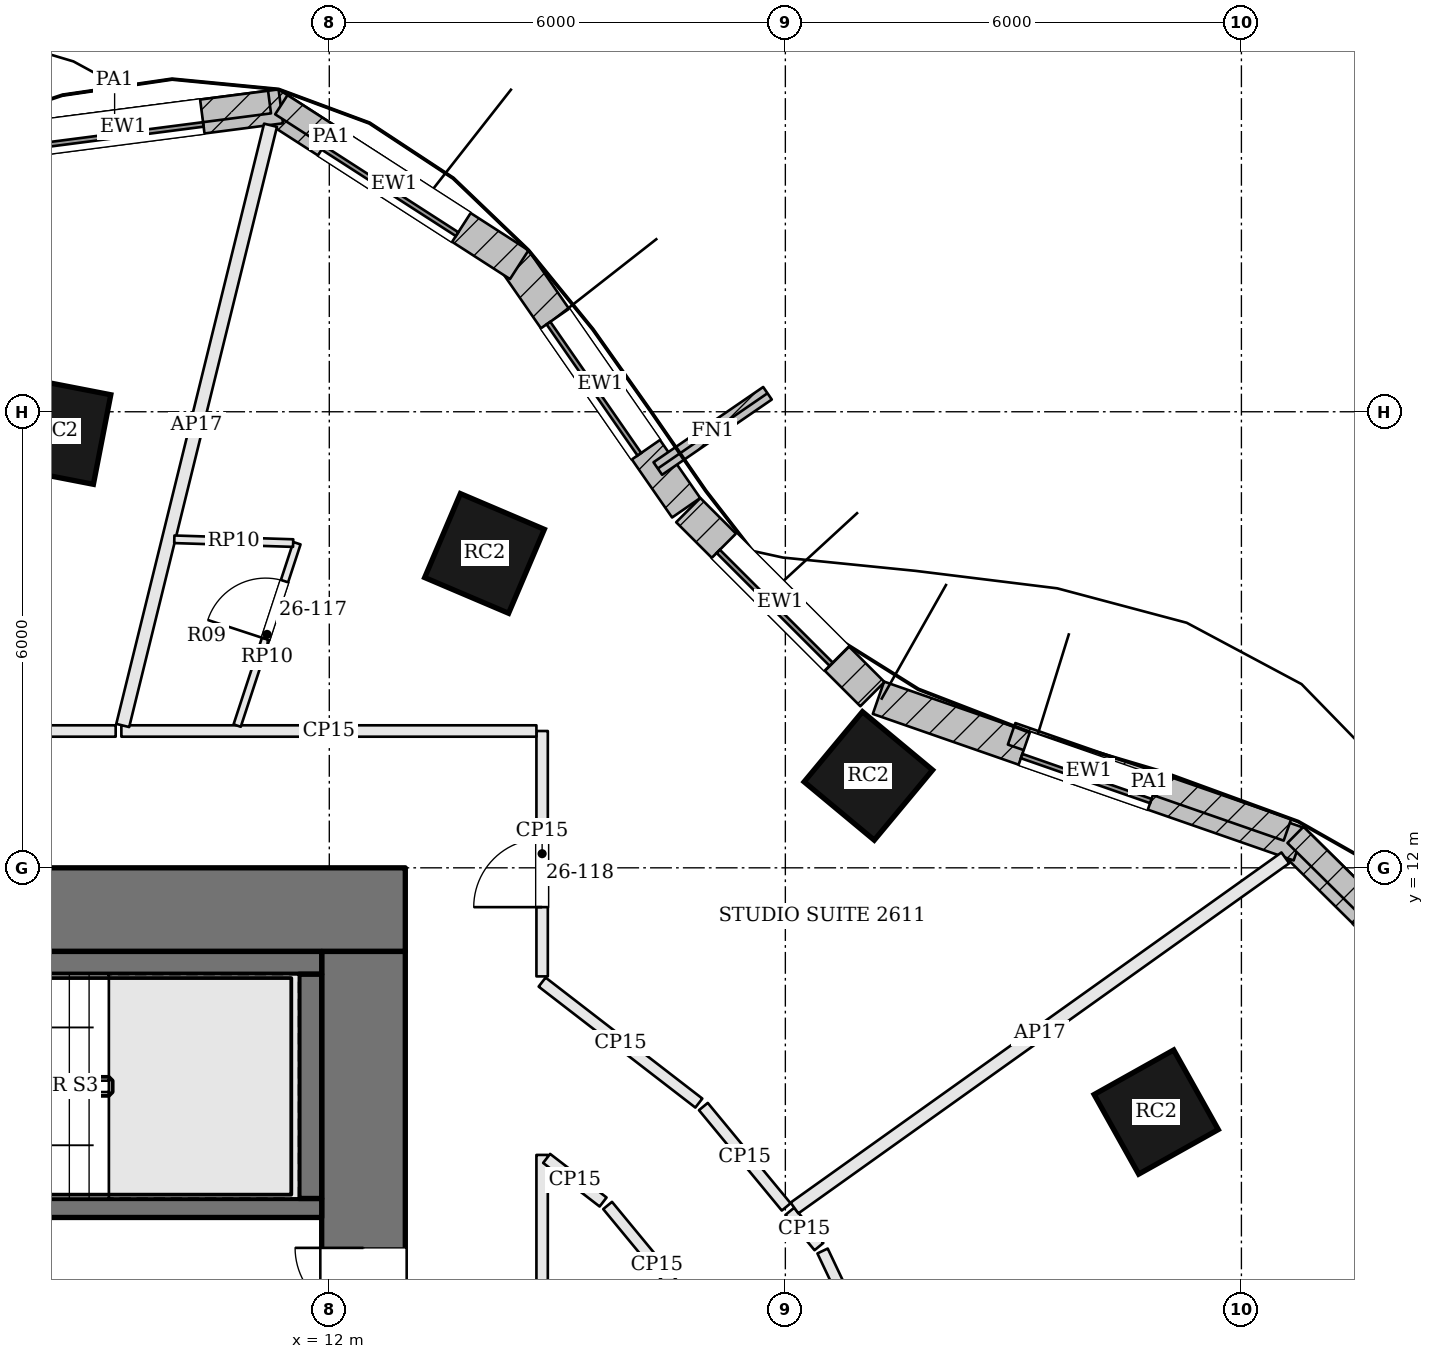
"""IFC4 building model, lengths in metres.
Left out: names, types, materials, properties, quantities, classifications, styles, units other than length and angle.
Written with IfcOpenShell. Run it as: python <this file> out.ifc"""

import sys

from ifc_helpers import new_model, si_unit, direction, frame, frame_2d, origin, origin_2d, place, context, subcontext, project, spatial, rectangle, extrude, element, fill, save


model = new_model("IFC4")
c1 = context("Model", 3, precision=1e-05, world=origin(), true_north=direction((0.0, 1.0)))
c2 = subcontext(c1, "Body", "Model", "MODEL_VIEW")
j1 = project(units=[si_unit("LENGTHUNIT", "METRE"), si_unit("PLANEANGLEUNIT", "RADIAN")], contexts=[c1])
p1 = place(None, origin())
s1 = spatial("IfcSite", under=j1, at=p1, CompositionType="ELEMENT")
p2 = place(p1, origin())
s2 = spatial("IfcBuilding", under=s1, at=p2, CompositionType="ELEMENT")
p3 = place(p2, frame((0.0, 0.0, 110.4)))
s3 = spatial("IfcBuildingStorey", under=s2, at=p3, CompositionType="ELEMENT", Elevation=110.4)
p4 = place(p3, frame((-13.0, 11.45, 0.0), z_axis=(0.0, 0.0, 1.0), x_axis=(1.0, 0.0, 0.0)))
e1 = element("IfcWall", 1, at=p4, inside=s3, PredefinedType="SHEAR", context=c2, shape_type="SweptSolid", body=[
    extrude(rectangle(XDim=26.0, YDim=1.1, at=frame_2d((13.0, 0.0))), origin(), (0.0, 0.0, 1.0), 3.6),
])
p5 = place(p4, frame((9.225, 0.0, 0.0)))
e2 = element("IfcOpeningElement", 2, at=p5, cuts=e1, PredefinedType="OPENING", context=c2, shape_type="SweptSolid", body=[
    extrude(rectangle(XDim=1.0, YDim=2.1, at=frame_2d((0.5, 1.05))), frame((0.0, 0.56, 0.0), z_axis=(0.0, -1.0, 0.0), x_axis=(1.0, 0.0, 0.0)), (0.0, 0.0, 1.0), 1.12),
])
p6 = place(p4, frame((11.825, 0.0, 0.0)))
e3 = element("IfcOpeningElement", 3, at=p6, cuts=e1, PredefinedType="OPENING", context=c2, shape_type="SweptSolid", body=[
    extrude(rectangle(XDim=0.7, YDim=2.1, at=frame_2d((0.35, 1.05))), frame((0.0, 0.56, 0.0), z_axis=(0.0, -1.0, 0.0), x_axis=(1.0, 0.0, 0.0)), (0.0, 0.0, 1.0), 1.12),
])
p7 = place(p4, frame((13.725, 0.0, 0.0)))
e4 = element("IfcOpeningElement", 4, at=p7, cuts=e1, PredefinedType="OPENING", context=c2, shape_type="SweptSolid", body=[
    extrude(rectangle(XDim=1.0, YDim=2.1, at=frame_2d((0.5, 1.05))), frame((0.0, 0.56, 0.0), z_axis=(0.0, -1.0, 0.0), x_axis=(1.0, 0.0, 0.0)), (0.0, 0.0, 1.0), 1.12),
])
p8 = place(p4, frame((16.225, 0.0, 0.0)))
e5 = element("IfcOpeningElement", 5, at=p8, cuts=e1, PredefinedType="OPENING", context=c2, shape_type="SweptSolid", body=[
    extrude(rectangle(XDim=0.9, YDim=2.1, at=frame_2d((0.45, 1.05))), frame((0.0, 0.56, 0.0), z_axis=(0.0, -1.0, 0.0), x_axis=(1.0, 0.0, 0.0)), (0.0, 0.0, 1.0), 1.12),
])
p9 = place(p3, frame((12.45, -1.9, 0.0), z_axis=(0.0, 0.0, 1.0), x_axis=(0.0, 1.0, 0.0)))
e6 = element("IfcWall", 6, at=p9, inside=s3, PredefinedType="SHEAR", context=c2, shape_type="SweptSolid", body=[
    extrude(rectangle(XDim=12.8, YDim=1.1, at=frame_2d((6.4, 0.0))), origin(), (0.0, 0.0, 1.0), 3.6),
])
p10 = place(p9, frame((7.1, 0.0, 0.0)))
e7 = element("IfcOpeningElement", 7, at=p10, cuts=e6, PredefinedType="OPENING", context=c2, shape_type="SweptSolid", body=[
    extrude(rectangle(XDim=1.8, YDim=2.1, at=frame_2d((0.9, 1.05))), frame((0.0, 0.56, 0.0), z_axis=(0.0, -1.0, 0.0), x_axis=(1.0, 0.0, 0.0)), (0.0, 0.0, 1.0), 1.12),
])
for number, where, z_axis, x_axis in (
    (8, (22.879, 8.787, 0.0), (0.0, 0.0, 1.0), (-0.489, 0.873, 0.0)),
    (9, (19.092, 13.209, 0.0), (0.0, 0.0, 1.0), (-0.769, 0.639, 0.0)),
    (10, (14.042, 16.136, 0.0), (0.0, 0.0, 1.0), (-0.92, 0.392, 0.0)),
    (11, (8.422, 17.749, 0.0), (0.0, 0.0, 1.0), (-0.982, 0.191, 0.0)),
):
    element("IfcColumn", number, at=place(p3, frame(where, z_axis=z_axis, x_axis=x_axis)), inside=s3, PredefinedType="COLUMN", context=c2, shape_type="SweptSolid", body=[
        extrude(rectangle(XDim=1.2, YDim=1.2, at=origin_2d()), origin(), (0.0, 0.0, 1.0), 3.6),
    ])
p11 = place(p3, frame((28.068, 9.011, 0.0), z_axis=(0.0, 0.0, 1.0), x_axis=(-0.711293453435, 0.702895172199, 0.0)))
e12 = element("IfcWall", 12, at=p11, inside=s3, PredefinedType="SOLIDWALL", context=c2, shape_type="SweptSolid", body=[
    extrude(rectangle(XDim=4.768, YDim=0.45, at=frame_2d((2.384, 0.0))), origin(), (0.0, 0.0, 1.0), 3.4),
])
p12 = place(p11, frame((1.334, 0.0, 0.9)))
e13 = element("IfcOpeningElement", 13, at=p12, cuts=e12, PredefinedType="OPENING", context=c2, shape_type="SweptSolid", body=[
    extrude(rectangle(XDim=2.1, YDim=2.0, at=frame_2d((1.05, 1.0))), frame((0.0, 0.235, 0.0), z_axis=(0.0, -1.0, 0.0), x_axis=(1.0, 0.0, 0.0)), (0.0, 0.0, 1.0), 0.47),
])
p13 = place(p3, frame((24.761, 12.31, 0.0), z_axis=(0.0, 0.0, 1.0), x_axis=(-0.944397305248, 0.328806523414, 0.0)))
e14 = element("IfcWall", 14, at=p13, inside=s3, PredefinedType="SOLIDWALL", context=c2, shape_type="SweptSolid", body=[
    extrude(rectangle(XDim=5.862, YDim=0.45, at=frame_2d((2.931, 0.0))), origin(), (0.0, 0.0, 1.0), 3.4),
])
p14 = place(p13, frame((2.031, 0.0, 0.9)))
e15 = element("IfcOpeningElement", 15, at=p14, cuts=e14, PredefinedType="OPENING", context=c2, shape_type="SweptSolid", body=[
    extrude(rectangle(XDim=1.8, YDim=2.0, at=frame_2d((0.9, 1.0))), frame((0.0, 0.235, 0.0), z_axis=(0.0, -1.0, 0.0), x_axis=(1.0, 0.0, 0.0)), (0.0, 0.0, 1.0), 0.47),
])
p15 = place(p3, frame((19.145, 14.285, 0.0), z_axis=(0.0, 0.0, 1.0), x_axis=(-0.707427521052, 0.706785895769, 0.0)))
e16 = element("IfcWall", 16, at=p15, inside=s3, PredefinedType="SOLIDWALL", context=c2, shape_type="SweptSolid", body=[
    extrude(rectangle(XDim=3.425, YDim=0.45, at=frame_2d((1.712, 0.0))), origin(), (0.0, 0.0, 1.0), 3.4),
])
p16 = place(p15, frame((0.662, 0.0, 0.9)))
e17 = element("IfcOpeningElement", 17, at=p16, cuts=e16, PredefinedType="OPENING", context=c2, shape_type="SweptSolid", body=[
    extrude(rectangle(XDim=2.1, YDim=2.0, at=frame_2d((1.05, 1.0))), frame((0.0, 0.235, 0.0), z_axis=(0.0, -1.0, 0.0), x_axis=(1.0, 0.0, 0.0)), (0.0, 0.0, 1.0), 0.47),
])
p17 = place(p3, frame((16.695, 16.737, 0.0), z_axis=(0.0, 0.0, 1.0), x_axis=(-0.569652445465, 0.821885692402, 0.0)))
e18 = element("IfcWall", 18, at=p17, inside=s3, PredefinedType="SOLIDWALL", context=c2, shape_type="SweptSolid", body=[
    extrude(rectangle(XDim=3.959, YDim=0.45, at=frame_2d((1.979, 0.0))), origin(), (0.0, 0.0, 1.0), 3.4),
])
p18 = place(p17, frame((0.929, 0.0, 0.9)))
e19 = element("IfcOpeningElement", 19, at=p18, cuts=e18, PredefinedType="OPENING", context=c2, shape_type="SweptSolid", body=[
    extrude(rectangle(XDim=2.1, YDim=2.0, at=frame_2d((1.05, 1.0))), frame((0.0, 0.235, 0.0), z_axis=(0.0, -1.0, 0.0), x_axis=(1.0, 0.0, 0.0)), (0.0, 0.0, 1.0), 0.47),
])
p19 = place(p3, frame((14.499, 19.935, 0.0), z_axis=(0.0, 0.0, 1.0), x_axis=(-0.84080910763, 0.541331732422, 0.0)))
e20 = element("IfcWall", 20, at=p19, inside=s3, PredefinedType="SOLIDWALL", context=c2, shape_type="SweptSolid", body=[
    extrude(rectangle(XDim=3.911, YDim=0.45, at=frame_2d((1.955, 0.0))), origin(), (0.0, 0.0, 1.0), 3.4),
])
p20 = place(p19, frame((0.905, 0.0, 0.9)))
e21 = element("IfcOpeningElement", 21, at=p20, cuts=e20, PredefinedType="OPENING", context=c2, shape_type="SweptSolid", body=[
    extrude(rectangle(XDim=2.1, YDim=2.0, at=frame_2d((1.05, 1.0))), frame((0.0, 0.235, 0.0), z_axis=(0.0, -1.0, 0.0), x_axis=(1.0, 0.0, 0.0)), (0.0, 0.0, 1.0), 0.47),
])
p21 = place(p3, frame((11.362, 22.018, 0.0), z_axis=(0.0, 0.0, 1.0), x_axis=(-0.991724958022, -0.128380713645, 0.0)))
e22 = element("IfcWall", 22, at=p21, inside=s3, PredefinedType="SOLIDWALL", context=c2, shape_type="SweptSolid", body=[
    extrude(rectangle(XDim=4.182, YDim=0.45, at=frame_2d((2.091, 0.0))), origin(), (0.0, 0.0, 1.0), 3.4),
])
p22 = place(p21, frame((1.041, 0.0, 0.9)))
e23 = element("IfcOpeningElement", 23, at=p22, cuts=e22, PredefinedType="OPENING", context=c2, shape_type="SweptSolid", body=[
    extrude(rectangle(XDim=2.1, YDim=2.0, at=frame_2d((1.05, 1.0))), frame((0.0, 0.235, 0.0), z_axis=(0.0, -1.0, 0.0), x_axis=(1.0, 0.0, 0.0)), (0.0, 0.0, 1.0), 0.47),
])
p23 = place(p3, frame((16.322, 17.253, 0.0), z_axis=(0.0, 0.0, 1.0), x_axis=(0.824440606412, 0.565948483962, 0.0)))
e24 = element("IfcWall", 24, at=p23, inside=s3, PredefinedType="SOLIDWALL", context=c2, shape_type="SweptSolid", body=[
    extrude(rectangle(XDim=1.75, YDim=0.2, at=frame_2d((0.875, 0.0))), origin(), (0.0, 0.0, 1.0), 3.4),
])
p24 = place(p3, frame((28.0, 9.183, 3.6), z_axis=(0.0, 0.0, 1.0), x_axis=(-0.711291435321, 0.702897214419, 0.0)))
e25 = element("IfcWall", 25, at=p24, inside=s3, PredefinedType="PARAPET", context=c2, shape_type="SweptSolid", body=[
    extrude(rectangle(XDim=4.625, YDim=0.3, at=frame_2d((2.312, 0.0))), origin(), (0.0, 0.0, 1.0), 1.1),
])
p25 = place(p3, frame((24.605, 12.5, 3.6), z_axis=(0.0, 0.0, 1.0), x_axis=(-0.944373295981, 0.328875474668, 0.0)))
e26 = element("IfcWall", 26, at=p25, inside=s3, PredefinedType="PARAPET", context=c2, shape_type="SweptSolid", body=[
    extrude(rectangle(XDim=3.842, YDim=0.3, at=frame_2d((1.921, 0.0))), origin(), (0.0, 0.0, 1.0), 1.1),
])
p26 = place(p3, frame((12.68, 21.195, 3.6), z_axis=(0.0, 0.0, 1.0), x_axis=(-0.840806975541, 0.541335044018, 0.0)))
e27 = element("IfcWall", 27, at=p26, inside=s3, PredefinedType="PARAPET", context=c2, shape_type="SweptSolid", body=[
    extrude(rectangle(XDim=1.56, YDim=0.3, at=frame_2d((0.78, 0.0))), origin(), (0.0, 0.0, 1.0), 1.1),
])
p27 = place(p3, frame((11.214, 22.074, 3.6), z_axis=(0.0, 0.0, 1.0), x_axis=(-0.991727449614, -0.128361464939, 0.0)))
e28 = element("IfcWall", 28, at=p27, inside=s3, PredefinedType="PARAPET", context=c2, shape_type="SweptSolid", body=[
    extrude(rectangle(XDim=4.11, YDim=0.3, at=frame_2d((2.055, 0.0))), origin(), (0.0, 0.0, 1.0), 1.1),
])
p28 = place(p3, frame((11.9, 7.525, 0.0), z_axis=(0.0, 0.0, 1.0), x_axis=(-1.0, 0.0, 0.0)))
e29 = element("IfcWall", 29, at=p28, inside=s3, PredefinedType="SOLIDWALL", context=c2, shape_type="SweptSolid", body=[
    extrude(rectangle(XDim=6.8, YDim=0.25, at=frame_2d((3.4, 0.0))), origin(), (0.0, 0.0, 1.0), 3.4),
])
p29 = place(p28, frame((5.5, 0.0, 0.0)))
e30 = element("IfcOpeningElement", 30, at=p29, cuts=e29, PredefinedType="OPENING", context=c2, shape_type="SweptSolid", body=[
    extrude(rectangle(XDim=1.2, YDim=2.1, at=frame_2d((0.6, 1.05))), frame((0.0, 0.135, 0.0), z_axis=(0.0, -1.0, 0.0), x_axis=(1.0, 0.0, 0.0)), (0.0, 0.0, 1.0), 0.27),
])
p30 = place(p3, frame((11.9, 10.75, 0.0), z_axis=(0.0, 0.0, 1.0), x_axis=(-1.0, 0.0, 0.0)))
e31 = element("IfcWall", 31, at=p30, inside=s3, PredefinedType="SOLIDWALL", context=c2, shape_type="SweptSolid", body=[
    extrude(rectangle(XDim=6.8, YDim=0.3, at=frame_2d((3.4, 0.0))), origin(), (0.0, 0.0, 1.0), 3.4),
])
p31 = place(p3, frame((11.75, 10.6, 0.0), z_axis=(0.0, 0.0, 1.0), x_axis=(0.0, -1.0, 0.0)))
e32 = element("IfcWall", 32, at=p31, inside=s3, PredefinedType="SOLIDWALL", context=c2, shape_type="SweptSolid", body=[
    extrude(rectangle(XDim=2.95, YDim=0.3, at=frame_2d((1.475, 0.0))), origin(), (0.0, 0.0, 1.0), 3.4),
])
p32 = place(p3, frame((19.495, 4.836, 0.0), z_axis=(0.0, 0.0, 1.0), x_axis=(-0.428157819028, 0.903703979191, 0.0)))
e33 = element("IfcWall", 33, at=p32, inside=s3, PredefinedType="PARTITIONING", context=c2, shape_type="SweptSolid", body=[
    extrude(rectangle(XDim=2.349, YDim=0.15, at=frame_2d((1.175, 0.0))), origin(), (0.0, 0.0, 1.0), 2.784),
])
p33 = place(p3, frame((18.442, 7.017, 0.0), z_axis=(0.0, 0.0, 1.0), x_axis=(-0.636545885104, 0.771238832112, 0.0)))
e34 = element("IfcWall", 34, at=p33, inside=s3, PredefinedType="PARTITIONING", context=c2, shape_type="SweptSolid", body=[
    extrude(rectangle(XDim=0.602, YDim=0.15, at=frame_2d((0.301, 0.0))), origin(), (0.0, 0.0, 1.0), 2.784),
])
p34 = place(p3, frame((24.578, 12.131, 0.0), z_axis=(0.0, 0.0, 1.0), x_axis=(-0.814105550238, -0.580716930244, 0.0)))
e35 = element("IfcWall", 35, at=p34, inside=s3, PredefinedType="PARTITIONING", context=c2, shape_type="SweptSolid", body=[
    extrude(rectangle(XDim=7.932, YDim=0.175, at=frame_2d((3.966, 0.0))), origin(), (0.0, 0.0, 1.0), 2.784),
])
p35 = place(p3, frame((18.011, 7.539, 0.0), z_axis=(0.0, 0.0, 1.0), x_axis=(-0.636431742529, 0.771333026067, 0.0)))
e36 = element("IfcWall", 36, at=p35, inside=s3, PredefinedType="PARTITIONING", context=c2, shape_type="SweptSolid", body=[
    extrude(rectangle(XDim=1.712, YDim=0.15, at=frame_2d((0.856, 0.0))), origin(), (0.0, 0.0, 1.0), 2.784),
])
p36 = place(p3, frame((16.862, 8.905, 0.0), z_axis=(0.0, 0.0, 1.0), x_axis=(-0.791542595332, 0.611113999001, 0.0)))
e37 = element("IfcWall", 37, at=p36, inside=s3, PredefinedType="PARTITIONING", context=c2, shape_type="SweptSolid", body=[
    extrude(rectangle(XDim=2.605, YDim=0.15, at=frame_2d((1.302, 0.0))), origin(), (0.0, 0.0, 1.0), 2.784),
])
p37 = place(p3, frame((14.8, 10.572, 0.0), z_axis=(0.0, 0.0, 1.0), x_axis=(0.0, 1.0, 0.0)))
e38 = element("IfcWall", 38, at=p37, inside=s3, PredefinedType="PARTITIONING", context=c2, shape_type="SweptSolid", body=[
    extrude(rectangle(XDim=3.228, YDim=0.15, at=frame_2d((1.614, 0.0))), origin(), (0.0, 0.0, 1.0), 2.784),
])
p38 = place(p37, frame((0.911, 0.0, 0.0)))
e39 = element("IfcOpeningElement", 39, at=p38, cuts=e38, PredefinedType="OPENING", context=c2, shape_type="SweptSolid", body=[
    extrude(rectangle(XDim=0.9, YDim=2.4, at=frame_2d((0.45, 1.2))), frame((0.0, 0.085, 0.0), z_axis=(0.0, -1.0, 0.0), x_axis=(1.0, 0.0, 0.0)), (0.0, 0.0, 1.0), 0.17),
])
p39 = place(p3, frame((14.725, 13.8, 0.0), z_axis=(0.0, 0.0, 1.0), x_axis=(-1.0, 0.0, 0.0)))
e40 = element("IfcWall", 40, at=p39, inside=s3, PredefinedType="PARTITIONING", context=c2, shape_type="SweptSolid", body=[
    extrude(rectangle(XDim=5.461, YDim=0.15, at=frame_2d((2.73, 0.0))), origin(), (0.0, 0.0, 1.0), 2.784),
])
p40 = place(p3, frame((11.227, 21.769, 0.0), z_axis=(0.0, 0.0, 1.0), x_axis=(-0.23905867542, -0.971005123419, 0.0)))
e41 = element("IfcWall", 41, at=p40, inside=s3, PredefinedType="PARTITIONING", context=c2, shape_type="SweptSolid", body=[
    extrude(rectangle(XDim=8.132, YDim=0.175, at=frame_2d((4.066, 0.0))), origin(), (0.0, 0.0, 1.0), 2.784),
])
p41 = place(p3, frame((9.189, 13.8, 0.0), z_axis=(0.0, 0.0, 1.0), x_axis=(-1.0, 0.0, 0.0)))
e42 = element("IfcWall", 42, at=p41, inside=s3, PredefinedType="PARTITIONING", context=c2, shape_type="SweptSolid", body=[
    extrude(rectangle(XDim=6.129, YDim=0.15, at=frame_2d((3.064, 0.0))), origin(), (0.0, 0.0, 1.0), 2.784),
])
p42 = place(p41, frame((2.527, 0.0, 0.0)))
e43 = element("IfcOpeningElement", 43, at=p42, cuts=e42, PredefinedType="OPENING", context=c2, shape_type="SweptSolid", body=[
    extrude(rectangle(XDim=1.0, YDim=2.1, at=frame_2d((0.5, 1.05))), frame((0.0, 0.085, 0.0), z_axis=(0.0, -1.0, 0.0), x_axis=(1.0, 0.0, 0.0)), (0.0, 0.0, 1.0), 0.17),
])
p43 = place(p3, frame((15.662, 7.558, 0.0), z_axis=(0.0, 0.0, 1.0), x_axis=(0.636500564941, -0.7712762351, 0.0)))
e44 = element("IfcWall", 44, at=p43, inside=s3, PredefinedType="PARTITIONING", context=c2, shape_type="SweptSolid", body=[
    extrude(rectangle(XDim=2.038, YDim=0.15, at=frame_2d((1.019, 0.0))), origin(), (0.0, 0.0, 1.0), 2.784),
])
p44 = place(p3, frame((14.8, -4.725, 0.0), z_axis=(0.0, 0.0, 1.0), x_axis=(0.0, 1.0, 0.0)))
e45 = element("IfcWall", 45, at=p44, inside=s3, PredefinedType="PARTITIONING", context=c2, shape_type="SweptSolid", body=[
    extrude(rectangle(XDim=12.948, YDim=0.15, at=frame_2d((6.474, 0.0))), origin(), (0.0, 0.0, 1.0), 2.784),
])
p45 = place(p44, frame((8.486, 0.0, 0.0)))
e46 = element("IfcOpeningElement", 46, at=p45, cuts=e45, PredefinedType="OPENING", context=c2, shape_type="SweptSolid", body=[
    extrude(rectangle(XDim=0.7, YDim=2.1, at=frame_2d((0.35, 1.05))), frame((0.0, 0.085, 0.0), z_axis=(0.0, -1.0, 0.0), x_axis=(1.0, 0.0, 0.0)), (0.0, 0.0, 1.0), 0.17),
])
p46 = place(p3, frame((14.859, 8.177, 0.0), z_axis=(0.0, 0.0, 1.0), x_axis=(0.791588113465, -0.611055037309, 0.0)))
e47 = element("IfcWall", 47, at=p46, inside=s3, PredefinedType="PARTITIONING", context=c2, shape_type="SweptSolid", body=[
    extrude(rectangle(XDim=0.938, YDim=0.15, at=frame_2d((0.469, 0.0))), origin(), (0.0, 0.0, 1.0), 2.784),
])
p47 = place(p3, frame((10.788, 13.871, 0.0), z_axis=(0.0, 0.0, 1.0), x_axis=(0.311553531795, 0.950228602404, 0.0)))
e48 = element("IfcWall", 48, at=p47, inside=s3, PredefinedType="PARTITIONING", context=c2, shape_type="SweptSolid", body=[
    extrude(rectangle(XDim=2.525, YDim=0.1, at=frame_2d((1.262, 0.0))), origin(), (0.0, 0.0, 1.0), 2.884),
])
p48 = place(p47, frame((1.2, 0.0, 0.0)))
e49 = element("IfcOpeningElement", 49, at=p48, cuts=e48, PredefinedType="OPENING", context=c2, shape_type="SweptSolid", body=[
    extrude(rectangle(XDim=0.8, YDim=2.1, at=frame_2d((0.4, 1.05))), frame((0.0, 0.06, 0.0), z_axis=(0.0, -1.0, 0.0), x_axis=(1.0, 0.0, 0.0)), (0.0, 0.0, 1.0), 0.12),
])
p49 = place(p3, frame((11.524, 16.272, 0.0), z_axis=(0.0, 0.0, 1.0), x_axis=(-0.99948787379, 0.03199984603, 0.0)))
e50 = element("IfcWall", 50, at=p49, inside=s3, PredefinedType="PARTITIONING", context=c2, shape_type="SweptSolid", body=[
    extrude(rectangle(XDim=1.564, YDim=0.1, at=frame_2d((0.782, 0.0))), origin(), (0.0, 0.0, 1.0), 2.884),
])
p50 = place(p14, origin())
e51 = element("IfcWindow", 51, at=p50, inside=s3, PartitioningType="SINGLE_PANEL", PredefinedType="WINDOW", context=c2, shape_type="SweptSolid", body=[
    extrude(rectangle(XDim=1.8, YDim=2.0, at=frame_2d((0.9, 1.0))), frame((0.0, 0.135, 0.0), z_axis=(0.0, -1.0, 0.0), x_axis=(1.0, 0.0, 0.0)), (0.0, 0.0, 1.0), 0.06),
])
fill(e15, e51)
p51 = place(p16, origin())
e52 = element("IfcWindow", 52, at=p51, inside=s3, PartitioningType="SINGLE_PANEL", PredefinedType="WINDOW", context=c2, shape_type="SweptSolid", body=[
    extrude(rectangle(XDim=2.1, YDim=2.0, at=frame_2d((1.05, 1.0))), frame((0.0, 0.135, 0.0), z_axis=(0.0, -1.0, 0.0), x_axis=(1.0, 0.0, 0.0)), (0.0, 0.0, 1.0), 0.06),
])
fill(e17, e52)
p52 = place(p18, origin())
e53 = element("IfcWindow", 53, at=p52, inside=s3, PartitioningType="SINGLE_PANEL", PredefinedType="WINDOW", context=c2, shape_type="SweptSolid", body=[
    extrude(rectangle(XDim=2.1, YDim=2.0, at=frame_2d((1.05, 1.0))), frame((0.0, 0.135, 0.0), z_axis=(0.0, -1.0, 0.0), x_axis=(1.0, 0.0, 0.0)), (0.0, 0.0, 1.0), 0.06),
])
fill(e19, e53)
p53 = place(p20, origin())
e54 = element("IfcWindow", 54, at=p53, inside=s3, PartitioningType="SINGLE_PANEL", PredefinedType="WINDOW", context=c2, shape_type="SweptSolid", body=[
    extrude(rectangle(XDim=2.1, YDim=2.0, at=frame_2d((1.05, 1.0))), frame((0.0, 0.135, 0.0), z_axis=(0.0, -1.0, 0.0), x_axis=(1.0, 0.0, 0.0)), (0.0, 0.0, 1.0), 0.06),
])
fill(e21, e54)
p54 = place(p22, origin())
e55 = element("IfcWindow", 55, at=p54, inside=s3, PartitioningType="SINGLE_PANEL", PredefinedType="WINDOW", context=c2, shape_type="SweptSolid", body=[
    extrude(rectangle(XDim=2.1, YDim=2.0, at=frame_2d((1.05, 1.0))), frame((0.0, 0.135, 0.0), z_axis=(0.0, -1.0, 0.0), x_axis=(1.0, 0.0, 0.0)), (0.0, 0.0, 1.0), 0.06),
])
fill(e23, e55)
p55 = place(p10, origin())
e56 = element("IfcDoor", 56, at=p55, inside=s3, OperationType="DOUBLE_DOOR_SINGLE_SWING", PredefinedType="DOOR", context=c2, shape_type="SweptSolid", body=[
    extrude(rectangle(XDim=1.8, YDim=2.1, at=frame_2d((0.9, 1.05))), frame((0.0, 0.025, 0.0), z_axis=(0.0, -1.0, 0.0), x_axis=(1.0, 0.0, 0.0)), (0.0, 0.0, 1.0), 0.05),
])
fill(e7, e56)
p56 = place(p48, origin())
e57 = element("IfcDoor", 57, at=p56, inside=s3, OperationType="SINGLE_SWING_LEFT", PredefinedType="DOOR", context=c2, shape_type="SweptSolid", body=[
    extrude(rectangle(XDim=0.8, YDim=2.1, at=frame_2d((0.4, 1.05))), frame((0.0, 0.025, 0.0), z_axis=(0.0, -1.0, 0.0), x_axis=(1.0, 0.0, 0.0)), (0.0, 0.0, 1.0), 0.05),
])
fill(e49, e57)
p57 = place(p38, origin())
e58 = element("IfcDoor", 58, at=p57, inside=s3, OperationType="SINGLE_SWING_LEFT", PredefinedType="DOOR", context=c2, shape_type="SweptSolid", body=[
    extrude(rectangle(XDim=0.9, YDim=2.4, at=frame_2d((0.45, 1.2))), frame((0.0, 0.025, 0.0), z_axis=(0.0, -1.0, 0.0), x_axis=(1.0, 0.0, 0.0)), (0.0, 0.0, 1.0), 0.05),
])
fill(e39, e58)
save(model, sys.argv[1])
